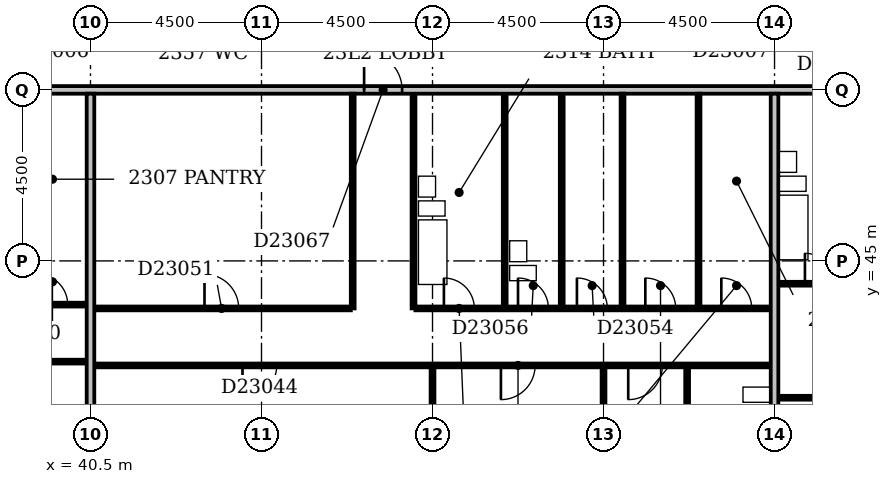
"""IFC4 building model, lengths in metres.
Left out: names, types, materials, properties, quantities, classifications, styles, units other than length and angle.
Written with IfcOpenShell. Run it as: python <this file> out.ifc"""

import sys

from ifc_helpers import new_model, si_unit, direction, frame, frame_2d, origin, place, context, subcontext, project, spatial, rectangle, extrude, element, fill, save


model = new_model("IFC4")
c1 = context("Model", 3, precision=1e-05, world=origin(), true_north=direction((0.0, 1.0)))
c2 = subcontext(c1, "Body", "Model", "MODEL_VIEW")
j1 = project(units=[si_unit("LENGTHUNIT", "METRE"), si_unit("PLANEANGLEUNIT", "RADIAN")], contexts=[c1])
p1 = place(None, origin())
s1 = spatial("IfcSite", under=j1, at=p1, CompositionType="ELEMENT")
p2 = place(p1, origin())
s2 = spatial("IfcBuilding", under=s1, at=p2, CompositionType="ELEMENT")
p3 = place(p2, frame((0.0, 0.0, 93.8)))
s3 = spatial("IfcBuildingStorey", under=s2, at=p3, CompositionType="ELEMENT", Elevation=93.8)
p4 = place(p3, frame((40.5, 36.6, 0.0), z_axis=(0.0, 0.0, 1.0), x_axis=(0.0, 1.0, 0.0)))
e1 = element("IfcWall", 1, at=p4, inside=s3, PredefinedType="PARTITIONING", context=c2, shape_type="SweptSolid", body=[
    extrude(rectangle(XDim=12.8, YDim=0.2, at=frame_2d((6.4, 0.0))), origin(), (0.0, 0.0, 1.0), 3.3),
])
p5 = place(p3, frame((49.5, 36.6, 0.0), z_axis=(0.0, 0.0, 1.0), x_axis=(0.0, 1.0, 0.0)))
e2 = element("IfcWall", 2, at=p5, inside=s3, PredefinedType="PARTITIONING", context=c2, shape_type="SweptSolid", body=[
    extrude(rectangle(XDim=5.6, YDim=0.1, at=frame_2d((2.8, 0.0))), origin(), (0.0, 0.0, 1.0), 3.3),
])
p6 = place(p3, frame((54.0, 36.6, 0.0), z_axis=(0.0, 0.0, 1.0), x_axis=(0.0, 1.0, 0.0)))
e3 = element("IfcWall", 3, at=p6, inside=s3, PredefinedType="PARTITIONING", context=c2, shape_type="SweptSolid", body=[
    extrude(rectangle(XDim=5.6, YDim=0.1, at=frame_2d((2.8, 0.0))), origin(), (0.0, 0.0, 1.0), 2.6),
])
p7 = place(p3, frame((58.5, 36.6, 0.0), z_axis=(0.0, 0.0, 1.0), x_axis=(0.0, 1.0, 0.0)))
e4 = element("IfcWall", 4, at=p7, inside=s3, PredefinedType="PARTITIONING", context=c2, shape_type="SweptSolid", body=[
    extrude(rectangle(XDim=12.8, YDim=0.2, at=frame_2d((6.4, 0.0))), origin(), (0.0, 0.0, 1.0), 3.3),
])
p8 = place(p3, frame((56.2, 39.35, 0.0), z_axis=(0.0, 0.0, 1.0), x_axis=(0.0, 1.0, 0.0)))
e5 = element("IfcWall", 5, at=p8, inside=s3, PredefinedType="PLUMBINGWALL", context=c2, shape_type="SweptSolid", body=[
    extrude(rectangle(XDim=2.85, YDim=0.1, at=frame_2d((1.425, 0.0))), origin(), (0.0, 0.0, 1.0), 3.3),
])
p9 = place(p8, frame((1.05, 0.0, 0.0)))
e6 = element("IfcOpeningElement", 6, at=p9, cuts=e5, PredefinedType="OPENING", context=c2, shape_type="SweptSolid", body=[
    extrude(rectangle(XDim=0.8, YDim=2.1, at=frame_2d((0.4, 1.05))), frame((0.0, 0.062, 0.0), z_axis=(0.0, -1.0, 0.0), x_axis=(1.0, 0.0, 0.0)), (0.0, 0.0, 1.0), 0.124),
])
p10 = place(p3, frame((58.6, 41.4, 0.0), z_axis=(0.0, 0.0, 1.0), x_axis=(1.0, 0.0, 0.0)))
e7 = element("IfcWall", 7, at=p10, inside=s3, PredefinedType="PARTITIONING", context=c2, shape_type="SweptSolid", body=[
    extrude(rectangle(XDim=9.5, YDim=0.1, at=frame_2d((4.75, 0.0))), origin(), (0.0, 0.0, 1.0), 3.3),
])
p11 = place(p10, frame((1.7, 0.0, 0.0)))
e8 = element("IfcOpeningElement", 8, at=p11, cuts=e7, PredefinedType="OPENING", context=c2, shape_type="SweptSolid", body=[
    extrude(rectangle(XDim=0.9, YDim=2.1, at=frame_2d((0.45, 1.05))), frame((0.0, 0.062, 0.0), z_axis=(0.0, -1.0, 0.0), x_axis=(1.0, 0.0, 0.0)), (0.0, 0.0, 1.0), 0.124),
])
p12 = place(p10, frame((6.2, 0.0, 0.0)))
e9 = element("IfcOpeningElement", 9, at=p12, cuts=e7, PredefinedType="OPENING", context=c2, shape_type="SweptSolid", body=[
    extrude(rectangle(XDim=0.9, YDim=2.1, at=frame_2d((0.45, 1.05))), frame((0.0, 0.062, 0.0), z_axis=(0.0, -1.0, 0.0), x_axis=(1.0, 0.0, 0.0)), (0.0, 0.0, 1.0), 0.124),
])
p13 = place(p3, frame((40.6, 42.25, 0.0), z_axis=(0.0, 0.0, 1.0), x_axis=(1.0, 0.0, 0.0)))
e10 = element("IfcWall", 10, at=p13, inside=s3, PredefinedType="PARTITIONING", context=c2, shape_type="SweptSolid", body=[
    extrude(rectangle(XDim=17.8, YDim=0.1, at=frame_2d((8.9, 0.0))), origin(), (0.0, 0.0, 1.0), 3.3),
])
p14 = place(p13, frame((3.9, 0.0, 0.0)))
e11 = element("IfcOpeningElement", 11, at=p14, cuts=e10, PredefinedType="OPENING", context=c2, shape_type="SweptSolid", body=[
    extrude(rectangle(XDim=0.9, YDim=2.1, at=frame_2d((0.45, 1.05))), frame((0.0, 0.062, 0.0), z_axis=(0.0, -1.0, 0.0), x_axis=(1.0, 0.0, 0.0)), (0.0, 0.0, 1.0), 0.124),
])
p15 = place(p13, frame((10.7, 0.0, 0.0)))
e12 = element("IfcOpeningElement", 12, at=p15, cuts=e10, PredefinedType="OPENING", context=c2, shape_type="SweptSolid", body=[
    extrude(rectangle(XDim=0.9, YDim=2.1, at=frame_2d((0.45, 1.05))), frame((0.0, 0.062, 0.0), z_axis=(0.0, -1.0, 0.0), x_axis=(1.0, 0.0, 0.0)), (0.0, 0.0, 1.0), 0.124),
])
p16 = place(p13, frame((14.05, 0.0, 0.0)))
e13 = element("IfcOpeningElement", 13, at=p16, cuts=e10, PredefinedType="OPENING", context=c2, shape_type="SweptSolid", body=[
    extrude(rectangle(XDim=0.9, YDim=2.1, at=frame_2d((0.45, 1.05))), frame((0.0, 0.062, 0.0), z_axis=(0.0, -1.0, 0.0), x_axis=(1.0, 0.0, 0.0)), (0.0, 0.0, 1.0), 0.124),
])
p17 = place(p3, frame((22.6, 42.35, 0.0), z_axis=(0.0, 0.0, 1.0), x_axis=(1.0, 0.0, 0.0)))
e14 = element("IfcWall", 14, at=p17, inside=s3, PredefinedType="PARTITIONING", context=c2, shape_type="SweptSolid", body=[
    extrude(rectangle(XDim=17.8, YDim=0.1, at=frame_2d((8.9, 0.0))), origin(), (0.0, 0.0, 1.0), 3.3),
])
p18 = place(p17, frame((1.7, 0.0, 0.0)))
e15 = element("IfcOpeningElement", 15, at=p18, cuts=e14, PredefinedType="OPENING", context=c2, shape_type="SweptSolid", body=[
    extrude(rectangle(XDim=0.9, YDim=2.1, at=frame_2d((0.45, 1.05))), frame((0.0, 0.062, 0.0), z_axis=(0.0, -1.0, 0.0), x_axis=(1.0, 0.0, 0.0)), (0.0, 0.0, 1.0), 0.124),
])
p19 = place(p17, frame((6.2, 0.0, 0.0)))
e16 = element("IfcOpeningElement", 16, at=p19, cuts=e14, PredefinedType="OPENING", context=c2, shape_type="SweptSolid", body=[
    extrude(rectangle(XDim=0.9, YDim=2.1, at=frame_2d((0.45, 1.05))), frame((0.0, 0.062, 0.0), z_axis=(0.0, -1.0, 0.0), x_axis=(1.0, 0.0, 0.0)), (0.0, 0.0, 1.0), 0.124),
])
p20 = place(p17, frame((10.7, 0.0, 0.0)))
e17 = element("IfcOpeningElement", 17, at=p20, cuts=e14, PredefinedType="OPENING", context=c2, shape_type="SweptSolid", body=[
    extrude(rectangle(XDim=0.9, YDim=2.1, at=frame_2d((0.45, 1.05))), frame((0.0, 0.062, 0.0), z_axis=(0.0, -1.0, 0.0), x_axis=(1.0, 0.0, 0.0)), (0.0, 0.0, 1.0), 0.124),
])
p21 = place(p17, frame((15.2, 0.0, 0.0)))
e18 = element("IfcOpeningElement", 18, at=p21, cuts=e14, PredefinedType="OPENING", context=c2, shape_type="SweptSolid", body=[
    extrude(rectangle(XDim=0.9, YDim=2.1, at=frame_2d((0.45, 1.05))), frame((0.0, 0.062, 0.0), z_axis=(0.0, -1.0, 0.0), x_axis=(1.0, 0.0, 0.0)), (0.0, 0.0, 1.0), 0.124),
])
p22 = place(p3, frame((40.6, 43.75, 0.0), z_axis=(0.0, 0.0, 1.0), x_axis=(1.0, 0.0, 0.0)))
e19 = element("IfcWall", 19, at=p22, inside=s3, PredefinedType="PARTITIONING", context=c2, shape_type="SweptSolid", body=[
    extrude(rectangle(XDim=6.75, YDim=0.1, at=frame_2d((3.375, 0.0))), origin(), (0.0, 0.0, 1.0), 3.3),
])
p23 = place(p22, frame((2.9, 0.0, 0.0)))
e20 = element("IfcOpeningElement", 20, at=p23, cuts=e19, PredefinedType="OPENING", context=c2, shape_type="SweptSolid", body=[
    extrude(rectangle(XDim=0.9, YDim=2.1, at=frame_2d((0.45, 1.05))), frame((0.0, 0.062, 0.0), z_axis=(0.0, -1.0, 0.0), x_axis=(1.0, 0.0, 0.0)), (0.0, 0.0, 1.0), 0.124),
])
p24 = place(p3, frame((47.4, 43.75, 0.0), z_axis=(0.0, 0.0, 1.0), x_axis=(0.0, 1.0, 0.0)))
e21 = element("IfcWall", 21, at=p24, inside=s3, PredefinedType="PARTITIONING", context=c2, shape_type="SweptSolid", body=[
    extrude(rectangle(XDim=5.65, YDim=0.1, at=frame_2d((2.825, 0.0))), origin(), (0.0, 0.0, 1.0), 3.3),
])
p25 = place(p3, frame((49.0, 43.75, 0.0), z_axis=(0.0, 0.0, 1.0), x_axis=(0.0, 1.0, 0.0)))
e22 = element("IfcWall", 22, at=p25, inside=s3, PredefinedType="PLUMBINGWALL", context=c2, shape_type="SweptSolid", body=[
    extrude(rectangle(XDim=5.65, YDim=0.1, at=frame_2d((2.825, 0.0))), origin(), (0.0, 0.0, 1.0), 3.3),
])
p26 = place(p3, frame((49.05, 43.75, 0.0), z_axis=(0.0, 0.0, 1.0), x_axis=(1.0, 0.0, 0.0)))
e23 = element("IfcWall", 23, at=p26, inside=s3, PredefinedType="PARTITIONING", context=c2, shape_type="SweptSolid", body=[
    extrude(rectangle(XDim=9.35, YDim=0.1, at=frame_2d((4.675, 0.0))), origin(), (0.0, 0.0, 1.0), 3.3),
])
p27 = place(p26, frame((0.75, 0.0, 0.0)))
e24 = element("IfcOpeningElement", 24, at=p27, cuts=e23, PredefinedType="OPENING", context=c2, shape_type="SweptSolid", body=[
    extrude(rectangle(XDim=0.8, YDim=2.1, at=frame_2d((0.4, 1.05))), frame((0.0, 0.062, 0.0), z_axis=(0.0, -1.0, 0.0), x_axis=(1.0, 0.0, 0.0)), (0.0, 0.0, 1.0), 0.124),
])
p28 = place(p26, frame((8.05, 0.0, 0.0)))
e25 = element("IfcOpeningElement", 25, at=p28, cuts=e23, PredefinedType="OPENING", context=c2, shape_type="SweptSolid", body=[
    extrude(rectangle(XDim=0.8, YDim=2.1, at=frame_2d((0.4, 1.05))), frame((0.0, 0.062, 0.0), z_axis=(0.0, -1.0, 0.0), x_axis=(1.0, 0.0, 0.0)), (0.0, 0.0, 1.0), 0.124),
])
p29 = place(p26, frame((4.25, 0.0, 0.0)))
e26 = element("IfcOpeningElement", 26, at=p29, cuts=e23, PredefinedType="OPENING", context=c2, shape_type="SweptSolid", body=[
    extrude(rectangle(XDim=0.8, YDim=2.1, at=frame_2d((0.4, 1.05))), frame((0.0, 0.062, 0.0), z_axis=(0.0, -1.0, 0.0), x_axis=(1.0, 0.0, 0.0)), (0.0, 0.0, 1.0), 0.124),
])
p30 = place(p26, frame((6.05, 0.0, 0.0)))
e27 = element("IfcOpeningElement", 27, at=p30, cuts=e23, PredefinedType="OPENING", context=c2, shape_type="SweptSolid", body=[
    extrude(rectangle(XDim=0.8, YDim=2.1, at=frame_2d((0.4, 1.05))), frame((0.0, 0.062, 0.0), z_axis=(0.0, -1.0, 0.0), x_axis=(1.0, 0.0, 0.0)), (0.0, 0.0, 1.0), 0.124),
])
p31 = place(p26, frame((2.7, 0.0, 0.0)))
e28 = element("IfcOpeningElement", 28, at=p31, cuts=e23, PredefinedType="OPENING", context=c2, shape_type="SweptSolid", body=[
    extrude(rectangle(XDim=0.8, YDim=2.1, at=frame_2d((0.4, 1.05))), frame((0.0, 0.062, 0.0), z_axis=(0.0, -1.0, 0.0), x_axis=(1.0, 0.0, 0.0)), (0.0, 0.0, 1.0), 0.124),
])
for number, where, z_axis, x_axis in (
    (29, (51.4, 43.8, 0.0), (0.0, 0.0, 1.0), (0.0, 1.0, 0.0)),
    (30, (52.9, 43.8, 0.0), (0.0, 0.0, 1.0), (0.0, 1.0, 0.0)),
):
    element("IfcWall", number, at=place(p3, frame(where, z_axis=z_axis, x_axis=x_axis)), inside=s3, PredefinedType="PLUMBINGWALL", context=c2, shape_type="SweptSolid", body=[
        extrude(rectangle(XDim=5.6, YDim=0.1, at=frame_2d((2.8, 0.0))), origin(), (0.0, 0.0, 1.0), 3.3),
    ])
p32 = place(p3, frame((54.5, 43.8, 0.0), z_axis=(0.0, 0.0, 1.0), x_axis=(0.0, 1.0, 0.0)))
e31 = element("IfcWall", 31, at=p32, inside=s3, PredefinedType="PARTITIONING", context=c2, shape_type="SweptSolid", body=[
    extrude(rectangle(XDim=5.6, YDim=0.1, at=frame_2d((2.8, 0.0))), origin(), (0.0, 0.0, 1.0), 2.6),
])
p33 = place(p3, frame((56.5, 43.8, 0.0), z_axis=(0.0, 0.0, 1.0), x_axis=(0.0, 1.0, 0.0)))
e32 = element("IfcWall", 32, at=p33, inside=s3, PredefinedType="PARTITIONING", context=c2, shape_type="SweptSolid", body=[
    extrude(rectangle(XDim=5.6, YDim=0.1, at=frame_2d((2.8, 0.0))), origin(), (0.0, 0.0, 1.0), 3.3),
])
p34 = place(p3, frame((24.15, 43.85, 0.0), z_axis=(0.0, 0.0, 1.0), x_axis=(1.0, 0.0, 0.0)))
e33 = element("IfcWall", 33, at=p34, inside=s3, PredefinedType="PARTITIONING", context=c2, shape_type="SweptSolid", body=[
    extrude(rectangle(XDim=16.25, YDim=0.1, at=frame_2d((8.125, 0.0))), origin(), (0.0, 0.0, 1.0), 3.3),
])
p35 = place(p34, frame((6.95, 0.0, 0.0)))
e34 = element("IfcOpeningElement", 34, at=p35, cuts=e33, PredefinedType="OPENING", context=c2, shape_type="SweptSolid", body=[
    extrude(rectangle(XDim=0.8, YDim=2.1, at=frame_2d((0.4, 1.05))), frame((0.0, 0.062, 0.0), z_axis=(0.0, -1.0, 0.0), x_axis=(1.0, 0.0, 0.0)), (0.0, 0.0, 1.0), 0.124),
])
p36 = place(p34, frame((9.25, 0.0, 0.0)))
e35 = element("IfcOpeningElement", 35, at=p36, cuts=e33, PredefinedType="OPENING", context=c2, shape_type="SweptSolid", body=[
    extrude(rectangle(XDim=0.8, YDim=2.1, at=frame_2d((0.4, 1.05))), frame((0.0, 0.062, 0.0), z_axis=(0.0, -1.0, 0.0), x_axis=(1.0, 0.0, 0.0)), (0.0, 0.0, 1.0), 0.124),
])
p37 = place(p34, frame((2.6, 0.0, 0.0)))
e36 = element("IfcOpeningElement", 36, at=p37, cuts=e33, PredefinedType="OPENING", context=c2, shape_type="SweptSolid", body=[
    extrude(rectangle(XDim=0.9, YDim=2.1, at=frame_2d((0.45, 1.05))), frame((0.0, 0.062, 0.0), z_axis=(0.0, -1.0, 0.0), x_axis=(1.0, 0.0, 0.0)), (0.0, 0.0, 1.0), 0.124),
])
p38 = place(p34, frame((14.95, 0.0, 0.0)))
e37 = element("IfcOpeningElement", 37, at=p38, cuts=e33, PredefinedType="OPENING", context=c2, shape_type="SweptSolid", body=[
    extrude(rectangle(XDim=0.8, YDim=2.1, at=frame_2d((0.4, 1.05))), frame((0.0, 0.062, 0.0), z_axis=(0.0, -1.0, 0.0), x_axis=(1.0, 0.0, 0.0)), (0.0, 0.0, 1.0), 0.124),
])
p39 = place(p34, frame((11.15, 0.0, 0.0)))
e38 = element("IfcOpeningElement", 38, at=p39, cuts=e33, PredefinedType="OPENING", context=c2, shape_type="SweptSolid", body=[
    extrude(rectangle(XDim=0.8, YDim=2.1, at=frame_2d((0.4, 1.05))), frame((0.0, 0.062, 0.0), z_axis=(0.0, -1.0, 0.0), x_axis=(1.0, 0.0, 0.0)), (0.0, 0.0, 1.0), 0.124),
])
p40 = place(p34, frame((12.95, 0.0, 0.0)))
e39 = element("IfcOpeningElement", 39, at=p40, cuts=e33, PredefinedType="OPENING", context=c2, shape_type="SweptSolid", body=[
    extrude(rectangle(XDim=0.8, YDim=2.1, at=frame_2d((0.4, 1.05))), frame((0.0, 0.062, 0.0), z_axis=(0.0, -1.0, 0.0), x_axis=(1.0, 0.0, 0.0)), (0.0, 0.0, 1.0), 0.124),
])
p41 = place(p3, frame((58.6, 44.4, 0.0), z_axis=(0.0, 0.0, 1.0), x_axis=(1.0, 0.0, 0.0)))
e40 = element("IfcWall", 40, at=p41, inside=s3, PredefinedType="PARTITIONING", context=c2, shape_type="SweptSolid", body=[
    extrude(rectangle(XDim=2.25, YDim=0.1, at=frame_2d((1.125, 0.0))), origin(), (0.0, 0.0, 1.0), 3.3),
])
p42 = place(p41, frame((0.7, 0.0, 0.0)))
e41 = element("IfcOpeningElement", 41, at=p42, cuts=e40, PredefinedType="OPENING", context=c2, shape_type="SweptSolid", body=[
    extrude(rectangle(XDim=0.8, YDim=2.1, at=frame_2d((0.4, 1.05))), frame((0.0, 0.062, 0.0), z_axis=(0.0, -1.0, 0.0), x_axis=(1.0, 0.0, 0.0)), (0.0, 0.0, 1.0), 0.124),
])
p43 = place(p3, frame((9.1, 49.5, 0.0), z_axis=(0.0, 0.0, 1.0), x_axis=(1.0, 0.0, 0.0)))
e42 = element("IfcWall", 42, at=p43, inside=s3, PredefinedType="PARTITIONING", context=c2, shape_type="SweptSolid", body=[
    extrude(rectangle(XDim=57.8, YDim=0.2, at=frame_2d((28.9, 0.0))), origin(), (0.0, 0.0, 1.0), 3.3),
])
p44 = place(p43, frame((13.7, 0.0, 0.0)))
e43 = element("IfcOpeningElement", 43, at=p44, cuts=e42, PredefinedType="OPENING", context=c2, shape_type="SweptSolid", body=[
    extrude(rectangle(XDim=1.0, YDim=2.1, at=frame_2d((0.5, 1.05))), frame((0.0, 0.112, 0.0), z_axis=(0.0, -1.0, 0.0), x_axis=(1.0, 0.0, 0.0)), (0.0, 0.0, 1.0), 0.224),
])
p45 = place(p43, frame((38.6, 0.0, 0.0)))
e44 = element("IfcOpeningElement", 44, at=p45, cuts=e42, PredefinedType="OPENING", context=c2, shape_type="SweptSolid", body=[
    extrude(rectangle(XDim=1.0, YDim=2.1, at=frame_2d((0.5, 1.05))), frame((0.0, 0.112, 0.0), z_axis=(0.0, -1.0, 0.0), x_axis=(1.0, 0.0, 0.0)), (0.0, 0.0, 1.0), 0.224),
])
p46 = place(p43, frame((52.1, 0.0, 0.0)))
e45 = element("IfcOpeningElement", 45, at=p46, cuts=e42, PredefinedType="OPENING", context=c2, shape_type="SweptSolid", body=[
    extrude(rectangle(XDim=1.0, YDim=2.1, at=frame_2d((0.5, 1.05))), frame((0.0, 0.112, 0.0), z_axis=(0.0, -1.0, 0.0), x_axis=(1.0, 0.0, 0.0)), (0.0, 0.0, 1.0), 0.224),
])
p47 = place(p43, frame((6.15, 0.0, 0.0)))
e46 = element("IfcOpeningElement", 46, at=p47, cuts=e42, PredefinedType="OPENING", context=c2, shape_type="SweptSolid", body=[
    extrude(rectangle(XDim=0.9, YDim=2.1, at=frame_2d((0.45, 1.05))), frame((0.0, 0.112, 0.0), z_axis=(0.0, -1.0, 0.0), x_axis=(1.0, 0.0, 0.0)), (0.0, 0.0, 1.0), 0.224),
])
p48 = place(p43, frame((10.65, 0.0, 0.0)))
e47 = element("IfcOpeningElement", 47, at=p48, cuts=e42, PredefinedType="OPENING", context=c2, shape_type="SweptSolid", body=[
    extrude(rectangle(XDim=0.9, YDim=2.1, at=frame_2d((0.45, 1.05))), frame((0.0, 0.112, 0.0), z_axis=(0.0, -1.0, 0.0), x_axis=(1.0, 0.0, 0.0)), (0.0, 0.0, 1.0), 0.224),
])
p49 = place(p14, frame((0.9, 0.0, 0.0), z_axis=(0.0, 0.0, 1.0), x_axis=(-1.0, 0.0, 0.0)))
e48 = element("IfcDoor", 48, at=p49, inside=s3, OperationType="SINGLE_SWING_RIGHT", PredefinedType="DOOR", context=c2, shape_type="SweptSolid", body=[
    extrude(rectangle(XDim=0.9, YDim=2.1, at=frame_2d((0.45, 1.05))), frame((0.0, 0.025, 0.0), z_axis=(0.0, -1.0, 0.0), x_axis=(1.0, 0.0, 0.0)), (0.0, 0.0, 1.0), 0.05),
])
fill(e11, e48)
p50 = place(p15, frame((0.9, 0.0, 0.0), z_axis=(0.0, 0.0, 1.0), x_axis=(-1.0, 0.0, 0.0)))
e49 = element("IfcDoor", 49, at=p50, inside=s3, OperationType="SINGLE_SWING_RIGHT", PredefinedType="DOOR", context=c2, shape_type="SweptSolid", body=[
    extrude(rectangle(XDim=0.9, YDim=2.1, at=frame_2d((0.45, 1.05))), frame((0.0, 0.025, 0.0), z_axis=(0.0, -1.0, 0.0), x_axis=(1.0, 0.0, 0.0)), (0.0, 0.0, 1.0), 0.05),
])
fill(e12, e49)
p51 = place(p16, frame((0.9, 0.0, 0.0), z_axis=(0.0, 0.0, 1.0), x_axis=(-1.0, 0.0, 0.0)))
e50 = element("IfcDoor", 50, at=p51, inside=s3, OperationType="SINGLE_SWING_RIGHT", PredefinedType="DOOR", context=c2, shape_type="SweptSolid", body=[
    extrude(rectangle(XDim=0.9, YDim=2.1, at=frame_2d((0.45, 1.05))), frame((0.0, 0.025, 0.0), z_axis=(0.0, -1.0, 0.0), x_axis=(1.0, 0.0, 0.0)), (0.0, 0.0, 1.0), 0.05),
])
fill(e13, e50)
p52 = place(p23, origin())
e51 = element("IfcDoor", 51, at=p52, inside=s3, OperationType="SINGLE_SWING_LEFT", PredefinedType="DOOR", context=c2, shape_type="SweptSolid", body=[
    extrude(rectangle(XDim=0.9, YDim=2.1, at=frame_2d((0.45, 1.05))), frame((0.0, 0.025, 0.0), z_axis=(0.0, -1.0, 0.0), x_axis=(1.0, 0.0, 0.0)), (0.0, 0.0, 1.0), 0.05),
])
fill(e20, e51)
p53 = place(p27, origin())
e52 = element("IfcDoor", 52, at=p53, inside=s3, OperationType="SINGLE_SWING_LEFT", PredefinedType="DOOR", context=c2, shape_type="SweptSolid", body=[
    extrude(rectangle(XDim=0.8, YDim=2.1, at=frame_2d((0.4, 1.05))), frame((0.0, 0.025, 0.0), z_axis=(0.0, -1.0, 0.0), x_axis=(1.0, 0.0, 0.0)), (0.0, 0.0, 1.0), 0.05),
])
fill(e24, e52)
p54 = place(p28, origin())
e53 = element("IfcDoor", 53, at=p54, inside=s3, OperationType="SINGLE_SWING_LEFT", PredefinedType="DOOR", context=c2, shape_type="SweptSolid", body=[
    extrude(rectangle(XDim=0.8, YDim=2.1, at=frame_2d((0.4, 1.05))), frame((0.0, 0.025, 0.0), z_axis=(0.0, -1.0, 0.0), x_axis=(1.0, 0.0, 0.0)), (0.0, 0.0, 1.0), 0.05),
])
fill(e25, e53)
p55 = place(p29, origin())
e54 = element("IfcDoor", 54, at=p55, inside=s3, OperationType="SINGLE_SWING_LEFT", PredefinedType="DOOR", context=c2, shape_type="SweptSolid", body=[
    extrude(rectangle(XDim=0.8, YDim=2.1, at=frame_2d((0.4, 1.05))), frame((0.0, 0.025, 0.0), z_axis=(0.0, -1.0, 0.0), x_axis=(1.0, 0.0, 0.0)), (0.0, 0.0, 1.0), 0.05),
])
fill(e26, e54)
p56 = place(p30, origin())
e55 = element("IfcDoor", 55, at=p56, inside=s3, OperationType="SINGLE_SWING_LEFT", PredefinedType="DOOR", context=c2, shape_type="SweptSolid", body=[
    extrude(rectangle(XDim=0.8, YDim=2.1, at=frame_2d((0.4, 1.05))), frame((0.0, 0.025, 0.0), z_axis=(0.0, -1.0, 0.0), x_axis=(1.0, 0.0, 0.0)), (0.0, 0.0, 1.0), 0.05),
])
fill(e27, e55)
p57 = place(p31, origin())
e56 = element("IfcDoor", 56, at=p57, inside=s3, OperationType="SINGLE_SWING_LEFT", PredefinedType="DOOR", context=c2, shape_type="SweptSolid", body=[
    extrude(rectangle(XDim=0.8, YDim=2.1, at=frame_2d((0.4, 1.05))), frame((0.0, 0.025, 0.0), z_axis=(0.0, -1.0, 0.0), x_axis=(1.0, 0.0, 0.0)), (0.0, 0.0, 1.0), 0.05),
])
fill(e28, e56)
p58 = place(p38, origin())
e57 = element("IfcDoor", 57, at=p58, inside=s3, OperationType="SINGLE_SWING_LEFT", PredefinedType="DOOR", context=c2, shape_type="SweptSolid", body=[
    extrude(rectangle(XDim=0.8, YDim=2.1, at=frame_2d((0.4, 1.05))), frame((0.0, 0.025, 0.0), z_axis=(0.0, -1.0, 0.0), x_axis=(1.0, 0.0, 0.0)), (0.0, 0.0, 1.0), 0.05),
])
fill(e37, e57)
p59 = place(p42, origin())
e58 = element("IfcDoor", 58, at=p59, inside=s3, OperationType="SINGLE_SWING_LEFT", PredefinedType="DOOR", context=c2, shape_type="SweptSolid", body=[
    extrude(rectangle(XDim=0.8, YDim=2.1, at=frame_2d((0.4, 1.05))), frame((0.0, 0.025, 0.0), z_axis=(0.0, -1.0, 0.0), x_axis=(1.0, 0.0, 0.0)), (0.0, 0.0, 1.0), 0.05),
])
fill(e41, e58)
p60 = place(p45, origin())
e59 = element("IfcDoor", 59, at=p60, inside=s3, OperationType="SINGLE_SWING_LEFT", PredefinedType="DOOR", context=c2, shape_type="SweptSolid", body=[
    extrude(rectangle(XDim=1.0, YDim=2.1, at=frame_2d((0.5, 1.05))), frame((0.0, 0.025, 0.0), z_axis=(0.0, -1.0, 0.0), x_axis=(1.0, 0.0, 0.0)), (0.0, 0.0, 1.0), 0.05),
])
fill(e44, e59)
save(model, sys.argv[1])
